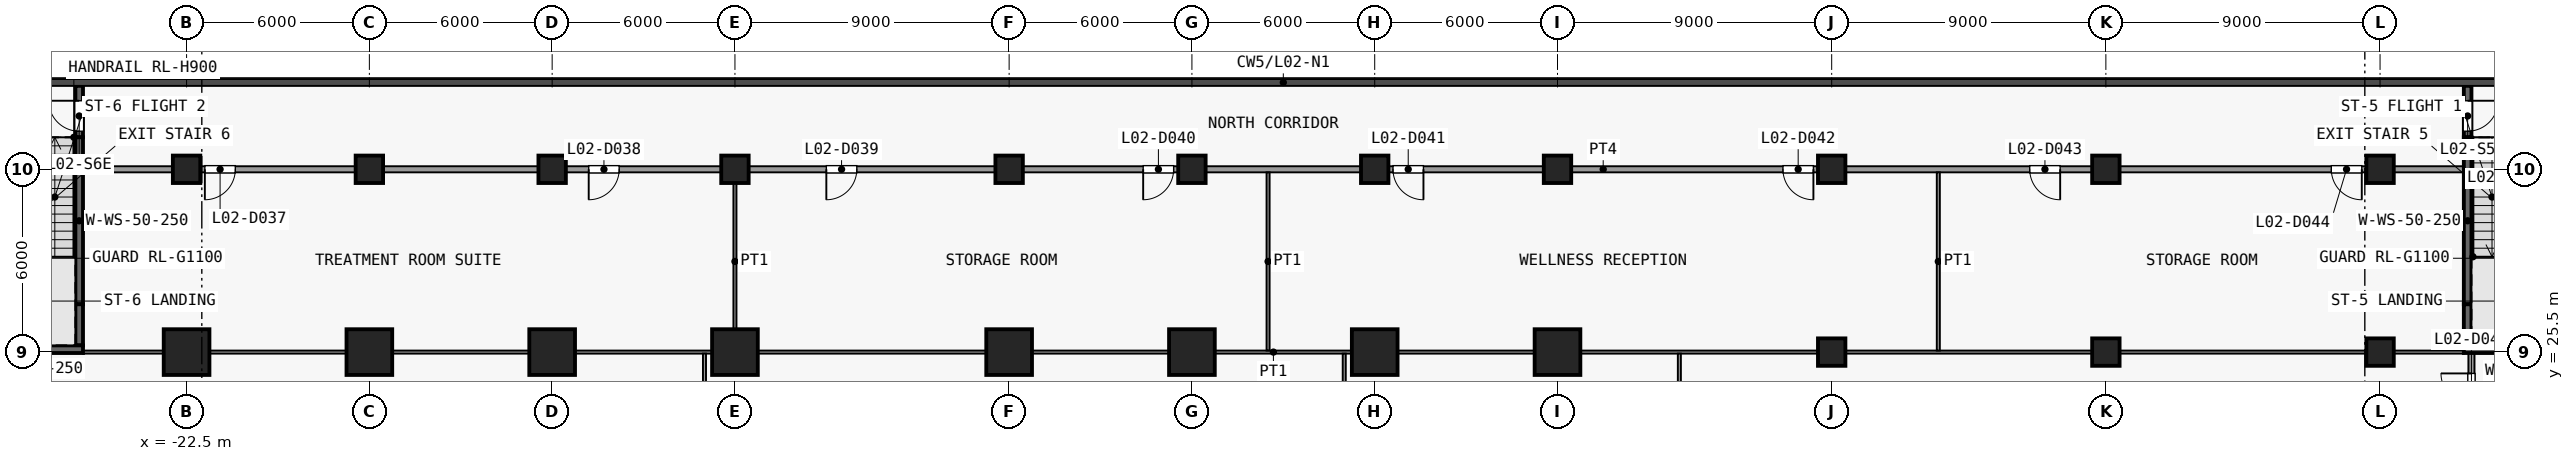
"""IFC4 building model, lengths in metres.
Left out: names, types, materials, properties, quantities, classifications, styles, units other than length and angle.
Written with IfcOpenShell. Run it as: python <this file> out.ifc"""

import sys

from ifc_helpers import new_model, si_unit, direction, frame, frame_2d, origin, origin_2d, place, context, subcontext, project, spatial, rectangle, extrude, element, fill, save


model = new_model("IFC4")
c1 = context("Model", 3, precision=1e-05, world=origin(), true_north=direction((0.0, 1.0)))
c2 = subcontext(c1, "Body", "Model", "MODEL_VIEW")
j1 = project(units=[si_unit("LENGTHUNIT", "METRE"), si_unit("PLANEANGLEUNIT", "RADIAN")], contexts=[c1])
p1 = place(None, origin())
s1 = spatial("IfcSite", under=j1, at=p1, CompositionType="ELEMENT")
p2 = place(p1, origin())
s2 = spatial("IfcBuilding", under=s1, at=p2, CompositionType="ELEMENT")
p3 = place(p2, frame((0.0, 0.0, 13.5)))
s3 = spatial("IfcBuildingStorey", under=s2, at=p3, CompositionType="ELEMENT", Elevation=13.5)
p4 = place(p3, frame((-22.5, 25.5, 0.0), z_axis=(0.0, 0.0, 1.0), x_axis=(1.0, 0.0, 0.0)))
e1 = element("IfcColumn", 1, at=p4, inside=s3, PredefinedType="COLUMN", context=c2, shape_type="SweptSolid", body=[
    extrude(rectangle(XDim=1.5, YDim=1.5, at=origin_2d()), origin(), (0.0, 0.0, 1.0), 5.0),
])
p5 = place(p3, frame((-22.5, 31.5, 0.0), z_axis=(0.0, 0.0, 1.0), x_axis=(1.0, 0.0, 0.0)))
e2 = element("IfcColumn", 2, at=p5, inside=s3, PredefinedType="COLUMN", context=c2, shape_type="SweptSolid", body=[
    extrude(rectangle(XDim=0.9, YDim=0.9, at=origin_2d()), origin(), (0.0, 0.0, 1.0), 5.0),
])
p6 = place(p3, frame((-16.5, 25.5, 0.0), z_axis=(0.0, 0.0, 1.0), x_axis=(1.0, 0.0, 0.0)))
e3 = element("IfcColumn", 3, at=p6, inside=s3, PredefinedType="COLUMN", context=c2, shape_type="SweptSolid", body=[
    extrude(rectangle(XDim=1.5, YDim=1.5, at=origin_2d()), origin(), (0.0, 0.0, 1.0), 5.0),
])
p7 = place(p3, frame((-16.5, 31.5, 0.0), z_axis=(0.0, 0.0, 1.0), x_axis=(1.0, 0.0, 0.0)))
e4 = element("IfcColumn", 4, at=p7, inside=s3, PredefinedType="COLUMN", context=c2, shape_type="SweptSolid", body=[
    extrude(rectangle(XDim=0.9, YDim=0.9, at=origin_2d()), origin(), (0.0, 0.0, 1.0), 5.0),
])
p8 = place(p3, frame((-10.5, 25.5, 0.0), z_axis=(0.0, 0.0, 1.0), x_axis=(1.0, 0.0, 0.0)))
e5 = element("IfcColumn", 5, at=p8, inside=s3, PredefinedType="COLUMN", context=c2, shape_type="SweptSolid", body=[
    extrude(rectangle(XDim=1.5, YDim=1.5, at=origin_2d()), origin(), (0.0, 0.0, 1.0), 5.0),
])
p9 = place(p3, frame((-10.5, 31.5, 0.0), z_axis=(0.0, 0.0, 1.0), x_axis=(1.0, 0.0, 0.0)))
e6 = element("IfcColumn", 6, at=p9, inside=s3, PredefinedType="COLUMN", context=c2, shape_type="SweptSolid", body=[
    extrude(rectangle(XDim=0.9, YDim=0.9, at=origin_2d()), origin(), (0.0, 0.0, 1.0), 5.0),
])
p10 = place(p3, frame((-4.5, 25.5, 0.0), z_axis=(0.0, 0.0, 1.0), x_axis=(1.0, 0.0, 0.0)))
e7 = element("IfcColumn", 7, at=p10, inside=s3, PredefinedType="COLUMN", context=c2, shape_type="SweptSolid", body=[
    extrude(rectangle(XDim=1.5, YDim=1.5, at=origin_2d()), origin(), (0.0, 0.0, 1.0), 5.0),
])
p11 = place(p3, frame((-4.5, 31.5, 0.0), z_axis=(0.0, 0.0, 1.0), x_axis=(1.0, 0.0, 0.0)))
e8 = element("IfcColumn", 8, at=p11, inside=s3, PredefinedType="COLUMN", context=c2, shape_type="SweptSolid", body=[
    extrude(rectangle(XDim=0.9, YDim=0.9, at=origin_2d()), origin(), (0.0, 0.0, 1.0), 5.0),
])
p12 = place(p3, frame((4.5, 25.5, 0.0), z_axis=(0.0, 0.0, 1.0), x_axis=(1.0, 0.0, 0.0)))
e9 = element("IfcColumn", 9, at=p12, inside=s3, PredefinedType="COLUMN", context=c2, shape_type="SweptSolid", body=[
    extrude(rectangle(XDim=1.5, YDim=1.5, at=origin_2d()), origin(), (0.0, 0.0, 1.0), 5.0),
])
p13 = place(p3, frame((4.5, 31.5, 0.0), z_axis=(0.0, 0.0, 1.0), x_axis=(1.0, 0.0, 0.0)))
e10 = element("IfcColumn", 10, at=p13, inside=s3, PredefinedType="COLUMN", context=c2, shape_type="SweptSolid", body=[
    extrude(rectangle(XDim=0.9, YDim=0.9, at=origin_2d()), origin(), (0.0, 0.0, 1.0), 5.0),
])
p14 = place(p3, frame((10.5, 25.5, 0.0), z_axis=(0.0, 0.0, 1.0), x_axis=(1.0, 0.0, 0.0)))
e11 = element("IfcColumn", 11, at=p14, inside=s3, PredefinedType="COLUMN", context=c2, shape_type="SweptSolid", body=[
    extrude(rectangle(XDim=1.5, YDim=1.5, at=origin_2d()), origin(), (0.0, 0.0, 1.0), 5.0),
])
p15 = place(p3, frame((10.5, 31.5, 0.0), z_axis=(0.0, 0.0, 1.0), x_axis=(1.0, 0.0, 0.0)))
e12 = element("IfcColumn", 12, at=p15, inside=s3, PredefinedType="COLUMN", context=c2, shape_type="SweptSolid", body=[
    extrude(rectangle(XDim=0.9, YDim=0.9, at=origin_2d()), origin(), (0.0, 0.0, 1.0), 5.0),
])
p16 = place(p3, frame((16.5, 25.5, 0.0), z_axis=(0.0, 0.0, 1.0), x_axis=(1.0, 0.0, 0.0)))
e13 = element("IfcColumn", 13, at=p16, inside=s3, PredefinedType="COLUMN", context=c2, shape_type="SweptSolid", body=[
    extrude(rectangle(XDim=1.5, YDim=1.5, at=origin_2d()), origin(), (0.0, 0.0, 1.0), 5.0),
])
p17 = place(p3, frame((16.5, 31.5, 0.0), z_axis=(0.0, 0.0, 1.0), x_axis=(1.0, 0.0, 0.0)))
e14 = element("IfcColumn", 14, at=p17, inside=s3, PredefinedType="COLUMN", context=c2, shape_type="SweptSolid", body=[
    extrude(rectangle(XDim=0.9, YDim=0.9, at=origin_2d()), origin(), (0.0, 0.0, 1.0), 5.0),
])
p18 = place(p3, frame((22.5, 25.5, 0.0), z_axis=(0.0, 0.0, 1.0), x_axis=(1.0, 0.0, 0.0)))
e15 = element("IfcColumn", 15, at=p18, inside=s3, PredefinedType="COLUMN", context=c2, shape_type="SweptSolid", body=[
    extrude(rectangle(XDim=1.5, YDim=1.5, at=origin_2d()), origin(), (0.0, 0.0, 1.0), 5.0),
])
for number, where, z_axis, x_axis in (
    (16, (22.5, 31.5, 0.0), (0.0, 0.0, 1.0), (1.0, 0.0, 0.0)),
    (17, (31.5, 25.5, 0.0), (0.0, 0.0, 1.0), (1.0, 0.0, 0.0)),
    (18, (31.5, 31.5, 0.0), (0.0, 0.0, 1.0), (1.0, 0.0, 0.0)),
    (19, (40.5, 25.5, 0.0), (0.0, 0.0, 1.0), (1.0, 0.0, 0.0)),
    (20, (40.5, 31.5, 0.0), (0.0, 0.0, 1.0), (1.0, 0.0, 0.0)),
    (21, (49.5, 25.5, 0.0), (0.0, 0.0, 1.0), (1.0, 0.0, 0.0)),
    (22, (49.5, 31.5, 0.0), (0.0, 0.0, 1.0), (1.0, 0.0, 0.0)),
):
    element("IfcColumn", number, at=place(p3, frame(where, z_axis=z_axis, x_axis=x_axis)), inside=s3, PredefinedType="COLUMN", context=c2, shape_type="SweptSolid", body=[
        extrude(rectangle(XDim=0.9, YDim=0.9, at=origin_2d()), origin(), (0.0, 0.0, 1.0), 5.0),
    ])
p19 = place(p3, frame((52.375, 34.24, 0.0), z_axis=(0.0, 0.0, 1.0), x_axis=(0.0, -1.0, 0.0)))
e23 = element("IfcWall", 23, at=p19, inside=s3, PredefinedType="SHEAR", context=c2, shape_type="SweptSolid", body=[
    extrude(rectangle(XDim=1.69, YDim=0.25, at=frame_2d((0.845, 0.0))), origin(), (0.0, 0.0, 1.0), 4.65),
])
p20 = place(p19, frame((0.49, 0.0, 0.0)))
e24 = element("IfcOpeningElement", 24, at=p20, cuts=e23, PredefinedType="OPENING", context=c2, shape_type="SweptSolid", body=[
    extrude(rectangle(XDim=1.0, YDim=2.1, at=frame_2d((0.5, 1.05))), frame((0.0, 0.135, 0.0), z_axis=(0.0, -1.0, 0.0), x_axis=(1.0, 0.0, 0.0)), (0.0, 0.0, 1.0), 0.27),
])
p21 = place(p3, frame((52.375, 27.07, 0.0), z_axis=(0.0, 0.0, 1.0), x_axis=(0.0, 1.0, 0.0)))
e25 = element("IfcWall", 25, at=p21, inside=s3, PredefinedType="SHEAR", context=c2, shape_type="SweptSolid", body=[
    extrude(rectangle(XDim=5.48, YDim=0.25, at=frame_2d((2.74, 0.0))), origin(), (0.0, 0.0, 1.0), 4.65),
])
p22 = place(p3, frame((52.375, 25.72, 0.0), z_axis=(0.0, 0.0, 1.0), x_axis=(0.0, 1.0, 0.0)))
e26 = element("IfcWall", 26, at=p22, inside=s3, PredefinedType="SHEAR", context=c2, shape_type="SweptSolid", body=[
    extrude(rectangle(XDim=1.35, YDim=0.25, at=frame_2d((0.675, 0.0))), origin(), (0.0, 0.0, 1.0), 4.65),
])
p23 = place(p3, frame((52.25, 25.595, 0.0), z_axis=(0.0, 0.0, 1.0), x_axis=(1.0, 0.0, 0.0)))
e27 = element("IfcWall", 27, at=p23, inside=s3, PredefinedType="SHEAR", context=c2, shape_type="SweptSolid", body=[
    extrude(rectangle(XDim=3.35, YDim=0.25, at=frame_2d((1.675, 0.0))), origin(), (0.0, 0.0, 1.0), 4.65),
])
p24 = place(p3, frame((-26.025, 32.55, 0.0), z_axis=(0.0, 0.0, 1.0), x_axis=(0.0, 1.0, 0.0)))
e28 = element("IfcWall", 28, at=p24, inside=s3, PredefinedType="SHEAR", context=c2, shape_type="SweptSolid", body=[
    extrude(rectangle(XDim=1.69, YDim=0.25, at=frame_2d((0.845, 0.0))), origin(), (0.0, 0.0, 1.0), 4.65),
])
p25 = place(p24, frame((0.2, 0.0, 0.0)))
e29 = element("IfcOpeningElement", 29, at=p25, cuts=e28, PredefinedType="OPENING", context=c2, shape_type="SweptSolid", body=[
    extrude(rectangle(XDim=1.0, YDim=2.1, at=frame_2d((0.5, 1.05))), frame((0.0, 0.135, 0.0), z_axis=(0.0, -1.0, 0.0), x_axis=(1.0, 0.0, 0.0)), (0.0, 0.0, 1.0), 0.27),
])
p26 = place(p3, frame((-26.025, 27.07, 0.0), z_axis=(0.0, 0.0, 1.0), x_axis=(0.0, 1.0, 0.0)))
e30 = element("IfcWall", 30, at=p26, inside=s3, PredefinedType="SHEAR", context=c2, shape_type="SweptSolid", body=[
    extrude(rectangle(XDim=5.48, YDim=0.25, at=frame_2d((2.74, 0.0))), origin(), (0.0, 0.0, 1.0), 4.65),
])
p27 = place(p3, frame((-26.025, 25.72, 0.0), z_axis=(0.0, 0.0, 1.0), x_axis=(0.0, 1.0, 0.0)))
e31 = element("IfcWall", 31, at=p27, inside=s3, PredefinedType="SHEAR", context=c2, shape_type="SweptSolid", body=[
    extrude(rectangle(XDim=1.35, YDim=0.25, at=frame_2d((0.675, 0.0))), origin(), (0.0, 0.0, 1.0), 4.65),
])
p28 = place(p3, frame((-29.25, 25.595, 0.0), z_axis=(0.0, 0.0, 1.0), x_axis=(1.0, 0.0, 0.0)))
e32 = element("IfcWall", 32, at=p28, inside=s3, PredefinedType="SHEAR", context=c2, shape_type="SweptSolid", body=[
    extrude(rectangle(XDim=3.35, YDim=0.25, at=frame_2d((1.675, 0.0))), origin(), (0.0, 0.0, 1.0), 4.65),
])
p29 = place(p3, frame((-25.9, 25.5, 0.0), z_axis=(0.0, 0.0, 1.0), x_axis=(1.0, 0.0, 0.0)))
e33 = element("IfcWall", 33, at=p29, inside=s3, PredefinedType="PARTITIONING", context=c2, shape_type="SweptSolid", body=[
    extrude(rectangle(XDim=78.15, YDim=0.1, at=frame_2d((39.075, 0.0))), origin(), (0.0, 0.0, 1.0), 4.65),
])
p30 = place(p3, frame((-25.9, 31.5, 0.0), z_axis=(0.0, 0.0, 1.0), x_axis=(1.0, 0.0, 0.0)))
e34 = element("IfcWall", 34, at=p30, inside=s3, PredefinedType="PARTITIONING", context=c2, shape_type="SweptSolid", body=[
    extrude(rectangle(XDim=78.15, YDim=0.2, at=frame_2d((39.075, 0.0))), origin(), (0.0, 0.0, 1.0), 4.65),
])
p31 = place(p30, frame((4.0, 0.0, 0.0)))
e35 = element("IfcOpeningElement", 35, at=p31, cuts=e34, PredefinedType="OPENING", context=c2, shape_type="SweptSolid", body=[
    extrude(rectangle(XDim=1.0, YDim=2.1, at=frame_2d((0.5, 1.05))), frame((0.0, 0.11, 0.0), z_axis=(0.0, -1.0, 0.0), x_axis=(1.0, 0.0, 0.0)), (0.0, 0.0, 1.0), 0.22),
])
p32 = place(p30, frame((16.6, 0.0, 0.0)))
e36 = element("IfcOpeningElement", 36, at=p32, cuts=e34, PredefinedType="OPENING", context=c2, shape_type="SweptSolid", body=[
    extrude(rectangle(XDim=1.0, YDim=2.1, at=frame_2d((0.5, 1.05))), frame((0.0, 0.11, 0.0), z_axis=(0.0, -1.0, 0.0), x_axis=(1.0, 0.0, 0.0)), (0.0, 0.0, 1.0), 0.22),
])
p33 = place(p30, frame((24.4, 0.0, 0.0)))
e37 = element("IfcOpeningElement", 37, at=p33, cuts=e34, PredefinedType="OPENING", context=c2, shape_type="SweptSolid", body=[
    extrude(rectangle(XDim=1.0, YDim=2.1, at=frame_2d((0.5, 1.05))), frame((0.0, 0.11, 0.0), z_axis=(0.0, -1.0, 0.0), x_axis=(1.0, 0.0, 0.0)), (0.0, 0.0, 1.0), 0.22),
])
p34 = place(p30, frame((34.8, 0.0, 0.0)))
e38 = element("IfcOpeningElement", 38, at=p34, cuts=e34, PredefinedType="OPENING", context=c2, shape_type="SweptSolid", body=[
    extrude(rectangle(XDim=1.0, YDim=2.1, at=frame_2d((0.5, 1.05))), frame((0.0, 0.11, 0.0), z_axis=(0.0, -1.0, 0.0), x_axis=(1.0, 0.0, 0.0)), (0.0, 0.0, 1.0), 0.22),
])
p35 = place(p30, frame((43.0, 0.0, 0.0)))
e39 = element("IfcOpeningElement", 39, at=p35, cuts=e34, PredefinedType="OPENING", context=c2, shape_type="SweptSolid", body=[
    extrude(rectangle(XDim=1.0, YDim=2.1, at=frame_2d((0.5, 1.05))), frame((0.0, 0.11, 0.0), z_axis=(0.0, -1.0, 0.0), x_axis=(1.0, 0.0, 0.0)), (0.0, 0.0, 1.0), 0.22),
])
p36 = place(p30, frame((55.8, 0.0, 0.0)))
e40 = element("IfcOpeningElement", 40, at=p36, cuts=e34, PredefinedType="OPENING", context=c2, shape_type="SweptSolid", body=[
    extrude(rectangle(XDim=1.0, YDim=2.1, at=frame_2d((0.5, 1.05))), frame((0.0, 0.11, 0.0), z_axis=(0.0, -1.0, 0.0), x_axis=(1.0, 0.0, 0.0)), (0.0, 0.0, 1.0), 0.22),
])
p37 = place(p30, frame((63.9, 0.0, 0.0)))
e41 = element("IfcOpeningElement", 41, at=p37, cuts=e34, PredefinedType="OPENING", context=c2, shape_type="SweptSolid", body=[
    extrude(rectangle(XDim=1.0, YDim=2.1, at=frame_2d((0.5, 1.05))), frame((0.0, 0.11, 0.0), z_axis=(0.0, -1.0, 0.0), x_axis=(1.0, 0.0, 0.0)), (0.0, 0.0, 1.0), 0.22),
])
p38 = place(p30, frame((73.8, 0.0, 0.0)))
e42 = element("IfcOpeningElement", 42, at=p38, cuts=e34, PredefinedType="OPENING", context=c2, shape_type="SweptSolid", body=[
    extrude(rectangle(XDim=1.0, YDim=2.1, at=frame_2d((0.5, 1.05))), frame((0.0, 0.11, 0.0), z_axis=(0.0, -1.0, 0.0), x_axis=(1.0, 0.0, 0.0)), (0.0, 0.0, 1.0), 0.22),
])
for number, where, z_axis, x_axis in (
    (43, (-5.5, 19.6, 0.0), (0.0, 0.0, 1.0), (0.0, 1.0, 0.0)),
    (44, (-4.5, 25.55, 0.0), (0.0, 0.0, 1.0), (0.0, 1.0, 0.0)),
    (45, (13.0, 25.55, 0.0), (0.0, 0.0, 1.0), (0.0, 1.0, 0.0)),
    (46, (15.5, 19.6, 0.0), (0.0, 0.0, 1.0), (0.0, 1.0, 0.0)),
    (47, (26.5, 19.6, 0.0), (0.0, 0.0, 1.0), (0.0, 1.0, 0.0)),
    (48, (35.0, 25.55, 0.0), (0.0, 0.0, 1.0), (0.0, 1.0, 0.0)),
):
    element("IfcWall", number, at=place(p3, frame(where, z_axis=z_axis, x_axis=x_axis)), inside=s3, PredefinedType="PARTITIONING", context=c2, shape_type="SweptSolid", body=[
        extrude(rectangle(XDim=5.85, YDim=0.1, at=frame_2d((2.925, 0.0))), origin(), (0.0, 0.0, 1.0), 4.65),
    ])
p39 = place(p3, frame((52.5, 16.6, 0.0), z_axis=(0.0, 0.0, 1.0), x_axis=(0.0, 1.0, 0.0)))
e49 = element("IfcWall", 49, at=p39, inside=s3, PredefinedType="PARTITIONING", context=c2, shape_type="SweptSolid", body=[
    extrude(rectangle(XDim=8.87, YDim=0.2, at=frame_2d((4.435, 0.0))), origin(), (0.0, 0.0, 1.0), 4.65),
])
p40 = place(p39, frame((0.9, 0.0, 0.0)))
e50 = element("IfcOpeningElement", 50, at=p40, cuts=e49, PredefinedType="OPENING", context=c2, shape_type="SweptSolid", body=[
    extrude(rectangle(XDim=1.0, YDim=2.1, at=frame_2d((0.5, 1.05))), frame((0.0, 0.11, 0.0), z_axis=(0.0, -1.0, 0.0), x_axis=(1.0, 0.0, 0.0)), (0.0, 0.0, 1.0), 0.22),
])
p41 = place(p39, frame((3.6, 0.0, 0.0)))
e51 = element("IfcOpeningElement", 51, at=p41, cuts=e49, PredefinedType="OPENING", context=c2, shape_type="SweptSolid", body=[
    extrude(rectangle(XDim=1.0, YDim=2.1, at=frame_2d((0.5, 1.05))), frame((0.0, 0.11, 0.0), z_axis=(0.0, -1.0, 0.0), x_axis=(1.0, 0.0, 0.0)), (0.0, 0.0, 1.0), 0.22),
])
p42 = place(p39, frame((7.2, 0.0, 0.0)))
e52 = element("IfcOpeningElement", 52, at=p42, cuts=e49, PredefinedType="OPENING", context=c2, shape_type="SweptSolid", body=[
    extrude(rectangle(XDim=1.0, YDim=2.1, at=frame_2d((0.5, 1.05))), frame((0.0, 0.11, 0.0), z_axis=(0.0, -1.0, 0.0), x_axis=(1.0, 0.0, 0.0)), (0.0, 0.0, 1.0), 0.22),
])
p43 = place(p20, origin())
e53 = element("IfcDoor", 53, at=p43, inside=s3, OperationType="SINGLE_SWING_LEFT", PredefinedType="DOOR", context=c2, shape_type="SweptSolid", body=[
    extrude(rectangle(XDim=1.0, YDim=2.1, at=frame_2d((0.5, 1.05))), frame((0.0, 0.025, 0.0), z_axis=(0.0, -1.0, 0.0), x_axis=(1.0, 0.0, 0.0)), (0.0, 0.0, 1.0), 0.05),
])
fill(e24, e53)
p44 = place(p25, origin())
e54 = element("IfcDoor", 54, at=p44, inside=s3, OperationType="SINGLE_SWING_RIGHT", PredefinedType="DOOR", context=c2, shape_type="SweptSolid", body=[
    extrude(rectangle(XDim=1.0, YDim=2.1, at=frame_2d((0.5, 1.05))), frame((0.0, 0.025, 0.0), z_axis=(0.0, -1.0, 0.0), x_axis=(1.0, 0.0, 0.0)), (0.0, 0.0, 1.0), 0.05),
])
fill(e29, e54)
p45 = place(p31, origin())
e55 = element("IfcDoor", 55, at=p45, inside=s3, OperationType="SINGLE_SWING_LEFT", PredefinedType="DOOR", context=c2, shape_type="SweptSolid", body=[
    extrude(rectangle(XDim=1.0, YDim=2.1, at=frame_2d((0.5, 1.05))), frame((0.0, 0.025, 0.0), z_axis=(0.0, -1.0, 0.0), x_axis=(1.0, 0.0, 0.0)), (0.0, 0.0, 1.0), 0.05),
])
fill(e35, e55)
p46 = place(p32, origin())
e56 = element("IfcDoor", 56, at=p46, inside=s3, OperationType="SINGLE_SWING_LEFT", PredefinedType="DOOR", context=c2, shape_type="SweptSolid", body=[
    extrude(rectangle(XDim=1.0, YDim=2.1, at=frame_2d((0.5, 1.05))), frame((0.0, 0.025, 0.0), z_axis=(0.0, -1.0, 0.0), x_axis=(1.0, 0.0, 0.0)), (0.0, 0.0, 1.0), 0.05),
])
fill(e36, e56)
p47 = place(p33, origin())
e57 = element("IfcDoor", 57, at=p47, inside=s3, OperationType="SINGLE_SWING_LEFT", PredefinedType="DOOR", context=c2, shape_type="SweptSolid", body=[
    extrude(rectangle(XDim=1.0, YDim=2.1, at=frame_2d((0.5, 1.05))), frame((0.0, 0.025, 0.0), z_axis=(0.0, -1.0, 0.0), x_axis=(1.0, 0.0, 0.0)), (0.0, 0.0, 1.0), 0.05),
])
fill(e37, e57)
p48 = place(p34, origin())
e58 = element("IfcDoor", 58, at=p48, inside=s3, OperationType="SINGLE_SWING_LEFT", PredefinedType="DOOR", context=c2, shape_type="SweptSolid", body=[
    extrude(rectangle(XDim=1.0, YDim=2.1, at=frame_2d((0.5, 1.05))), frame((0.0, 0.025, 0.0), z_axis=(0.0, -1.0, 0.0), x_axis=(1.0, 0.0, 0.0)), (0.0, 0.0, 1.0), 0.05),
])
fill(e38, e58)
p49 = place(p35, origin())
e59 = element("IfcDoor", 59, at=p49, inside=s3, OperationType="SINGLE_SWING_RIGHT", PredefinedType="DOOR", context=c2, shape_type="SweptSolid", body=[
    extrude(rectangle(XDim=1.0, YDim=2.1, at=frame_2d((0.5, 1.05))), frame((0.0, 0.025, 0.0), z_axis=(0.0, -1.0, 0.0), x_axis=(1.0, 0.0, 0.0)), (0.0, 0.0, 1.0), 0.05),
])
fill(e39, e59)
p50 = place(p36, origin())
e60 = element("IfcDoor", 60, at=p50, inside=s3, OperationType="SINGLE_SWING_RIGHT", PredefinedType="DOOR", context=c2, shape_type="SweptSolid", body=[
    extrude(rectangle(XDim=1.0, YDim=2.1, at=frame_2d((0.5, 1.05))), frame((0.0, 0.025, 0.0), z_axis=(0.0, -1.0, 0.0), x_axis=(1.0, 0.0, 0.0)), (0.0, 0.0, 1.0), 0.05),
])
fill(e40, e60)
p51 = place(p37, origin())
e61 = element("IfcDoor", 61, at=p51, inside=s3, OperationType="SINGLE_SWING_RIGHT", PredefinedType="DOOR", context=c2, shape_type="SweptSolid", body=[
    extrude(rectangle(XDim=1.0, YDim=2.1, at=frame_2d((0.5, 1.05))), frame((0.0, 0.025, 0.0), z_axis=(0.0, -1.0, 0.0), x_axis=(1.0, 0.0, 0.0)), (0.0, 0.0, 1.0), 0.05),
])
fill(e41, e61)
p52 = place(p38, origin())
e62 = element("IfcDoor", 62, at=p52, inside=s3, OperationType="SINGLE_SWING_RIGHT", PredefinedType="DOOR", context=c2, shape_type="SweptSolid", body=[
    extrude(rectangle(XDim=1.0, YDim=2.1, at=frame_2d((0.5, 1.05))), frame((0.0, 0.025, 0.0), z_axis=(0.0, -1.0, 0.0), x_axis=(1.0, 0.0, 0.0)), (0.0, 0.0, 1.0), 0.05),
])
fill(e42, e62)
p53 = place(p42, origin())
e63 = element("IfcDoor", 63, at=p53, inside=s3, OperationType="SINGLE_SWING_LEFT", PredefinedType="DOOR", context=c2, shape_type="SweptSolid", body=[
    extrude(rectangle(XDim=1.0, YDim=2.1, at=frame_2d((0.5, 1.05))), frame((0.0, 0.025, 0.0), z_axis=(0.0, -1.0, 0.0), x_axis=(1.0, 0.0, 0.0)), (0.0, 0.0, 1.0), 0.05),
])
fill(e52, e63)
save(model, sys.argv[1])
